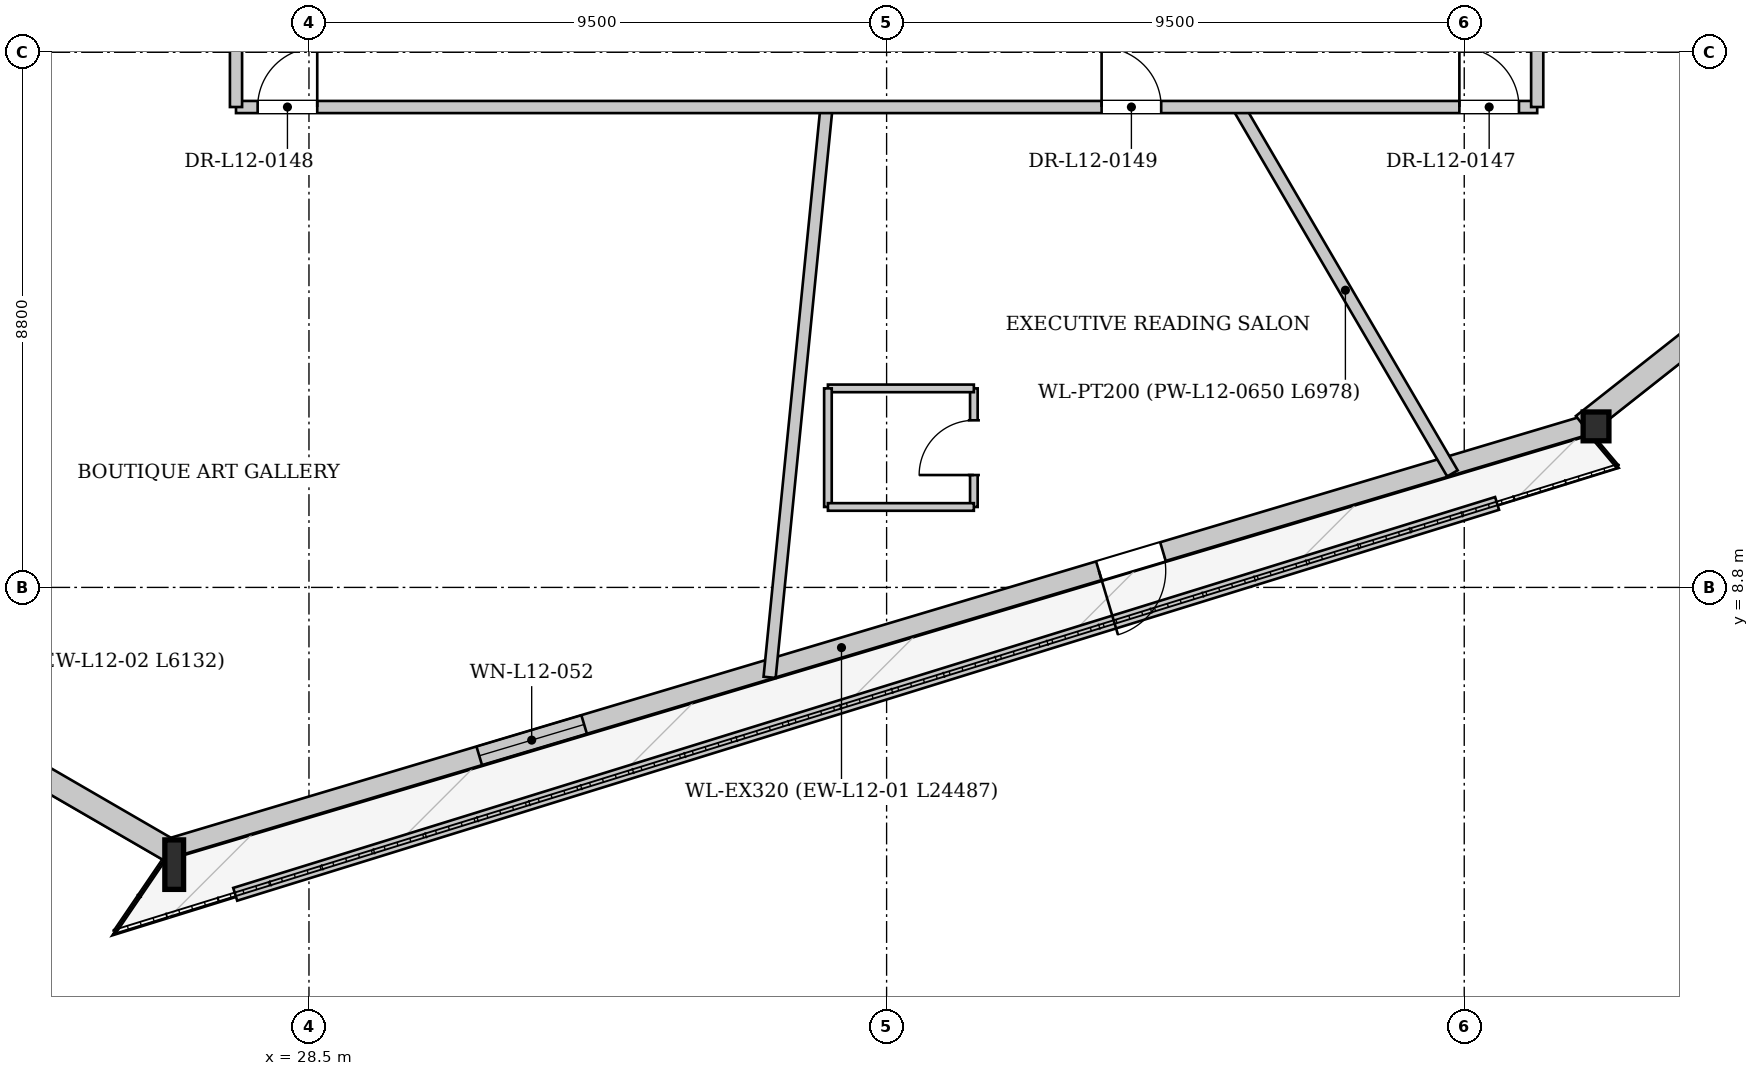
"""IFC4 building model, lengths in metres.
Left out: names, types, materials, properties, quantities, classifications, styles, units other than length and angle.
Written with IfcOpenShell. Run it as: python <this file> out.ifc"""

import sys

from ifc_helpers import new_model, si_unit, direction, frame, frame_2d, origin, origin_2d, place, context, subcontext, project, spatial, rectangle, i_section, extrude, source, transform, mapped, element, fill, save


model = new_model("IFC4")
c1 = context("Model", 3, precision=1e-05, world=origin(), true_north=direction((0.0, 1.0)))
c2 = subcontext(c1, "Body", "Model", "MODEL_VIEW")
j1 = project(units=[si_unit("LENGTHUNIT", "METRE"), si_unit("PLANEANGLEUNIT", "RADIAN")], contexts=[c1])
p1 = place(None, origin())
s1 = spatial("IfcSite", under=j1, at=p1, CompositionType="ELEMENT")
p2 = place(p1, origin())
s2 = spatial("IfcBuilding", under=s1, at=p2, CompositionType="ELEMENT")
p3 = place(p2, frame((0.0, 0.0, 50.6)))
s3 = spatial("IfcBuildingStorey", under=s2, at=p3, CompositionType="ELEMENT", Elevation=50.6)
m1 = source(origin(), c2, "Body", "SweptSolid", [
    extrude(i_section(OverallWidth=0.308, OverallDepth=0.814, WebThickness=0.021, FlangeThickness=0.04, at=origin_2d()), origin(), (0.0, 0.0, 1.0), 3.406),
])
p4 = place(p3, frame((26.109, 4.313, 0.0), z_axis=(0.102783523705, -0.042647277967, 0.993789090772), x_axis=(0.383242900224, 0.923647594826, 0.0)))
e1 = element("IfcColumn", 1, at=p4, inside=s3, PredefinedType="COLUMN", context=c2, shape_type="MappedRepresentation", body=[
    mapped(m1, transform((0.0, 0.0, 0.0), x_axis=(1.0, 0.0, 0.0), y_axis=(0.0, 1.0, 0.0), z_axis=(0.0, 0.0, 1.0), scale=1.0)),
])
m2 = source(origin(), c2, "Body", "SweptSolid", [
    extrude(i_section(OverallWidth=0.424, OverallDepth=0.474, WebThickness=0.043, FlangeThickness=0.068, at=origin_2d()), origin(), (0.0, 0.0, 1.0), 3.4),
])
p5 = place(p3, frame((49.572, 11.321, 0.0), z_axis=(0.056153057733, 0.074966486283, 0.995603766587), x_axis=(-0.800367834752, 0.599509240207, 0.0)))
e2 = element("IfcColumn", 2, at=p5, inside=s3, PredefinedType="COLUMN", context=c2, shape_type="MappedRepresentation", body=[
    mapped(m2, transform((0.0, 0.0, 0.0), x_axis=(1.0, 0.0, 0.0), y_axis=(0.0, 1.0, 0.0), z_axis=(0.0, 0.0, 1.0), scale=1.0)),
])
p6 = place(p3, frame((49.526, 11.474, 0.0), z_axis=(0.0, 0.0, 1.0), x_axis=(-0.958183644485, -0.286153985541, 0.0)))
e3 = element("IfcWall", 3, at=p6, inside=s3, PredefinedType="SOLIDWALL", context=c2, shape_type="SweptSolid", body=[
    extrude(rectangle(XDim=24.487, YDim=0.32, at=frame_2d((12.244, 0.0))), origin(), (0.0, 0.0, 1.0), 2.592),
])
p7 = place(p6, frame((7.286, 0.0, 0.0)))
e4 = element("IfcOpeningElement", 4, at=p7, cuts=e3, PredefinedType="OPENING", context=c2, shape_type="SweptSolid", body=[
    extrude(rectangle(XDim=1.1, YDim=2.3, at=frame_2d((0.55, 1.15))), frame((0.0, 0.17, 0.0), z_axis=(0.0, -1.0, 0.0), x_axis=(1.0, 0.0, 0.0)), (0.0, 0.0, 1.0), 0.34),
])
p8 = place(p6, frame((17.221, 0.0, 0.272)))
e5 = element("IfcOpeningElement", 5, at=p8, cuts=e3, PredefinedType="OPENING", context=c2, shape_type="SweptSolid", body=[
    extrude(rectangle(XDim=1.8, YDim=2.2, at=frame_2d((0.9, 1.1))), frame((0.0, 0.17, 0.0), z_axis=(0.0, -1.0, 0.0), x_axis=(1.0, 0.0, 0.0)), (0.0, 0.0, 1.0), 0.34),
])
p9 = place(p3, frame((26.204, 4.478, 0.0), z_axis=(0.0, 0.0, 1.0), x_axis=(-0.865169041167, 0.501480338803, 0.0)))
e6 = element("IfcWall", 6, at=p9, inside=s3, PredefinedType="SOLIDWALL", context=c2, shape_type="SweptSolid", body=[
    extrude(rectangle(XDim=6.132, YDim=0.38, at=frame_2d((3.066, 0.0))), origin(), (0.0, 0.0, 1.0), 2.592),
])
p10 = place(p3, frame((68.679, 26.637, 0.0), z_axis=(0.0, 0.0, 1.0), x_axis=(-0.785087909817, -0.619384350674, 0.0)))
e7 = element("IfcWall", 7, at=p10, inside=s3, PredefinedType="SOLIDWALL", context=c2, shape_type="SweptSolid", body=[
    extrude(rectangle(XDim=24.487, YDim=0.38, at=frame_2d((12.244, 0.0))), origin(), (0.0, 0.0, 1.0), 2.592),
])
p11 = place(p10, frame((6.506, 0.0, 0.222)))
e8 = element("IfcOpeningElement", 8, at=p11, cuts=e7, PredefinedType="OPENING", context=c2, shape_type="SweptSolid", body=[
    extrude(rectangle(XDim=2.2, YDim=2.25, at=frame_2d((1.1, 1.125))), frame((0.0, 0.2, 0.0), z_axis=(0.0, -1.0, 0.0), x_axis=(1.0, 0.0, 0.0)), (0.0, 0.0, 1.0), 0.4),
])
p12 = place(p10, frame((16.531, 0.0, 0.222)))
e9 = element("IfcOpeningElement", 9, at=p12, cuts=e7, PredefinedType="OPENING", context=c2, shape_type="SweptSolid", body=[
    extrude(rectangle(XDim=2.2, YDim=2.25, at=frame_2d((1.1, 1.125))), frame((0.0, 0.2, 0.0), z_axis=(0.0, -1.0, 0.0), x_axis=(1.0, 0.0, 0.0)), (0.0, 0.0, 1.0), 0.4),
])
p13 = place(p3, frame((27.287, 3.753, 0.0), z_axis=(0.0, 0.0, 1.0), x_axis=(0.95522578955, 0.295877831173, 0.0)))
e10 = element("IfcWall", 10, at=p13, inside=s3, PredefinedType="PARAPET", context=c2, shape_type="SweptSolid", body=[
    extrude(rectangle(XDim=21.726, YDim=0.22, at=frame_2d((10.863, 0.0))), origin(), (0.0, 0.0, 1.0), 0.3),
])
p14 = place(p3, frame((43.785, 16.7, 0.0), z_axis=(0.0, 0.0, 1.0), x_axis=(0.504536520789, -0.863390351573, 0.0)))
e11 = element("IfcWall", 11, at=p14, inside=s3, PredefinedType="PARTITIONING", context=c2, shape_type="SweptSolid", body=[
    extrude(rectangle(XDim=6.978, YDim=0.2, at=frame_2d((3.489, 0.0))), origin(), (0.0, 0.0, 1.0), 3.3),
])
p15 = place(p3, frame((27.3, 21.312, 0.0), z_axis=(0.0, 0.0, 1.0), x_axis=(-0.896486110775, -0.443071837502, 0.0)))
e12 = element("IfcWall", 12, at=p15, inside=s3, PredefinedType="PARTITIONING", context=c2, shape_type="SweptSolid", body=[
    extrude(rectangle(XDim=10.339, YDim=0.2, at=frame_2d((5.17, 0.0))), origin(), (0.0, 0.0, 1.0), 3.3),
])
p16 = place(p3, frame((37.012, 16.7, 0.0), z_axis=(0.0, 0.0, 1.0), x_axis=(-0.099311369571, -0.995056406378, 0.0)))
e13 = element("IfcWall", 13, at=p16, inside=s3, PredefinedType="PARTITIONING", context=c2, shape_type="SweptSolid", body=[
    extrude(rectangle(XDim=9.425, YDim=0.2, at=frame_2d((4.713, 0.0))), origin(), (0.0, 0.0, 1.0), 3.3),
])
p17 = place(p3, frame((39.435, 10.123, 0.0), z_axis=(0.0, 0.0, 1.0), x_axis=(0.0, 1.0, 0.0)))
e14 = element("IfcWall", 14, at=p17, inside=s3, PredefinedType="PARTITIONING", context=c2, shape_type="SweptSolid", body=[
    extrude(rectangle(XDim=1.95, YDim=0.125, at=frame_2d((0.975, 0.0))), origin(), (0.0, 0.0, 1.0), 3.3),
])
p18 = place(p17, frame((0.525, 0.0, 0.0)))
e15 = element("IfcOpeningElement", 15, at=p18, cuts=e14, PredefinedType="OPENING", context=c2, shape_type="SweptSolid", body=[
    extrude(rectangle(XDim=0.9, YDim=2.1, at=frame_2d((0.45, 1.05))), frame((0.0, 0.073, 0.0), z_axis=(0.0, -1.0, 0.0), x_axis=(1.0, 0.0, 0.0)), (0.0, 0.0, 1.0), 0.145),
])
p19 = place(p3, frame((39.435, 12.073, 0.0), z_axis=(0.0, 0.0, 1.0), x_axis=(-1.0, 0.0, 0.0)))
e16 = element("IfcWall", 16, at=p19, inside=s3, PredefinedType="PARTITIONING", context=c2, shape_type="SweptSolid", body=[
    extrude(rectangle(XDim=2.4, YDim=0.125, at=frame_2d((1.2, 0.0))), origin(), (0.0, 0.0, 1.0), 3.045),
])
p20 = place(p3, frame((37.035, 12.073, 0.0), z_axis=(0.0, 0.0, 1.0), x_axis=(0.0, -1.0, 0.0)))
e17 = element("IfcWall", 17, at=p20, inside=s3, PredefinedType="PARTITIONING", context=c2, shape_type="SweptSolid", body=[
    extrude(rectangle(XDim=1.95, YDim=0.125, at=frame_2d((0.975, 0.0))), origin(), (0.0, 0.0, 1.0), 3.3),
])
p21 = place(p3, frame((37.035, 10.123, 0.0), z_axis=(0.0, 0.0, 1.0), x_axis=(1.0, 0.0, 0.0)))
e18 = element("IfcWall", 18, at=p21, inside=s3, PredefinedType="PARTITIONING", context=c2, shape_type="SweptSolid", body=[
    extrude(rectangle(XDim=2.4, YDim=0.125, at=frame_2d((1.2, 0.0))), origin(), (0.0, 0.0, 1.0), 3.3),
])
p22 = place(p3, frame((27.3, 16.7, 0.0), z_axis=(0.0, 0.0, 1.0), x_axis=(1.0, 0.0, 0.0)))
e19 = element("IfcWall", 19, at=p22, inside=s3, PredefinedType="PARTITIONING", context=c2, shape_type="SweptSolid", body=[
    extrude(rectangle(XDim=21.4, YDim=0.2, at=frame_2d((10.7, 0.0))), origin(), (0.0, 0.0, 1.0), 3.3),
])
p23 = place(p22, frame((20.12, 0.0, 0.0)))
e20 = element("IfcOpeningElement", 20, at=p23, cuts=e19, PredefinedType="OPENING", context=c2, shape_type="SweptSolid", body=[
    extrude(rectangle(XDim=0.98, YDim=2.15, at=frame_2d((0.49, 1.075))), frame((0.0, 0.11, 0.0), z_axis=(0.0, -1.0, 0.0), x_axis=(1.0, 0.0, 0.0)), (0.0, 0.0, 1.0), 0.22),
])
p24 = place(p22, frame((0.356, 0.0, 0.0)))
e21 = element("IfcOpeningElement", 21, at=p24, cuts=e19, PredefinedType="OPENING", context=c2, shape_type="SweptSolid", body=[
    extrude(rectangle(XDim=0.98, YDim=2.15, at=frame_2d((0.49, 1.075))), frame((0.0, 0.11, 0.0), z_axis=(0.0, -1.0, 0.0), x_axis=(1.0, 0.0, 0.0)), (0.0, 0.0, 1.0), 0.22),
])
p25 = place(p22, frame((14.236, 0.0, 0.0)))
e22 = element("IfcOpeningElement", 22, at=p25, cuts=e19, PredefinedType="OPENING", context=c2, shape_type="SweptSolid", body=[
    extrude(rectangle(XDim=0.98, YDim=2.15, at=frame_2d((0.49, 1.075))), frame((0.0, 0.11, 0.0), z_axis=(0.0, -1.0, 0.0), x_axis=(1.0, 0.0, 0.0)), (0.0, 0.0, 1.0), 0.22),
])
p26 = place(p3, frame((27.3, 16.7, 0.0), z_axis=(0.0, 0.0, 1.0), x_axis=(0.0, 1.0, 0.0)))
e23 = element("IfcWall", 23, at=p26, inside=s3, PredefinedType="PARTITIONING", context=c2, shape_type="SweptSolid", body=[
    extrude(rectangle(XDim=19.8, YDim=0.2, at=frame_2d((9.9, 0.0))), origin(), (0.0, 0.0, 1.0), 3.3),
])
p27 = place(p26, frame((18.52, 0.0, 0.0)))
e24 = element("IfcOpeningElement", 24, at=p27, cuts=e23, PredefinedType="OPENING", context=c2, shape_type="SweptSolid", body=[
    extrude(rectangle(XDim=0.98, YDim=2.15, at=frame_2d((0.49, 1.075))), frame((0.0, 0.11, 0.0), z_axis=(0.0, -1.0, 0.0), x_axis=(1.0, 0.0, 0.0)), (0.0, 0.0, 1.0), 0.22),
])
p28 = place(p26, frame((12.028, 0.0, 0.0)))
e25 = element("IfcOpeningElement", 25, at=p28, cuts=e23, PredefinedType="OPENING", context=c2, shape_type="SweptSolid", body=[
    extrude(rectangle(XDim=0.98, YDim=2.15, at=frame_2d((0.49, 1.075))), frame((0.0, 0.11, 0.0), z_axis=(0.0, -1.0, 0.0), x_axis=(1.0, 0.0, 0.0)), (0.0, 0.0, 1.0), 0.22),
])
p29 = place(p3, frame((48.7, 16.7, 0.0), z_axis=(0.0, 0.0, 1.0), x_axis=(0.0, 1.0, 0.0)))
e26 = element("IfcWall", 26, at=p29, inside=s3, PredefinedType="PARTITIONING", context=c2, shape_type="SweptSolid", body=[
    extrude(rectangle(XDim=19.8, YDim=0.2, at=frame_2d((9.9, 0.0))), origin(), (0.0, 0.0, 1.0), 3.3),
])
p30 = place(p29, frame((16.457, 0.0, 0.0)))
e27 = element("IfcOpeningElement", 27, at=p30, cuts=e26, PredefinedType="OPENING", context=c2, shape_type="SweptSolid", body=[
    extrude(rectangle(XDim=0.98, YDim=2.15, at=frame_2d((0.49, 1.075))), frame((0.0, 0.11, 0.0), z_axis=(0.0, -1.0, 0.0), x_axis=(1.0, 0.0, 0.0)), (0.0, 0.0, 1.0), 0.22),
])
m3 = source(origin(), c2, "Body", "SweptSolid", [
    extrude(rectangle(XDim=1.1, YDim=2.3, at=frame_2d((0.55, 1.15))), frame((0.0, 0.025, 0.0), z_axis=(0.0, -1.0, 0.0), x_axis=(1.0, 0.0, 0.0)), (0.0, 0.0, 1.0), 0.05),
])
p31 = place(p7, origin())
e28 = element("IfcDoor", 28, at=p31, inside=s3, OperationType="SINGLE_SWING_RIGHT", PredefinedType="DOOR", context=c2, shape_type="MappedRepresentation", body=[
    mapped(m3, transform((0.0, 0.0, 0.0), x_axis=(1.0, 0.0, 0.0), y_axis=(0.0, 1.0, 0.0), z_axis=(0.0, 0.0, 1.0), scale=1.0)),
])
fill(e4, e28)
m4 = source(origin(), c2, "Body", "SweptSolid", [
    extrude(rectangle(XDim=1.8, YDim=2.2, at=frame_2d((0.9, 1.1))), frame((0.0, 0.03, 0.0), z_axis=(0.0, -1.0, 0.0), x_axis=(1.0, 0.0, 0.0)), (0.0, 0.0, 1.0), 0.06),
])
p32 = place(p8, origin())
e29 = element("IfcWindow", 29, at=p32, inside=s3, PartitioningType="SINGLE_PANEL", PredefinedType="WINDOW", context=c2, shape_type="MappedRepresentation", body=[
    mapped(m4, transform((0.0, 0.0, 0.0), x_axis=(1.0, 0.0, 0.0), y_axis=(0.0, 1.0, 0.0), z_axis=(0.0, 0.0, 1.0), scale=1.0)),
])
fill(e5, e29)
m5 = source(origin(), c2, "Body", "SweptSolid", [
    extrude(rectangle(XDim=0.9, YDim=2.1, at=frame_2d((0.45, 1.05))), frame((0.0, 0.025, 0.0), z_axis=(0.0, -1.0, 0.0), x_axis=(1.0, 0.0, 0.0)), (0.0, 0.0, 1.0), 0.05),
])
p33 = place(p18, origin())
e30 = element("IfcDoor", 30, at=p33, inside=s3, OperationType="SINGLE_SWING_LEFT", PredefinedType="DOOR", context=c2, shape_type="MappedRepresentation", body=[
    mapped(m5, transform((0.0, 0.0, 0.0), x_axis=(1.0, 0.0, 0.0), y_axis=(0.0, 1.0, 0.0), z_axis=(0.0, 0.0, 1.0), scale=1.0)),
])
fill(e15, e30)
m6 = source(origin(), c2, "Body", "SweptSolid", [
    extrude(rectangle(XDim=0.98, YDim=2.15, at=frame_2d((0.49, 1.075))), frame((0.0, 0.025, 0.0), z_axis=(0.0, -1.0, 0.0), x_axis=(1.0, 0.0, 0.0)), (0.0, 0.0, 1.0), 0.05),
])
p34 = place(p23, origin())
e31 = element("IfcDoor", 31, at=p34, inside=s3, OperationType="SINGLE_SWING_LEFT", PredefinedType="DOOR", context=c2, shape_type="MappedRepresentation", body=[
    mapped(m6, transform((0.0, 0.0, 0.0), x_axis=(1.0, 0.0, 0.0), y_axis=(0.0, 1.0, 0.0), z_axis=(0.0, 0.0, 1.0), scale=1.0)),
])
fill(e20, e31)
p35 = place(p24, origin())
e32 = element("IfcDoor", 32, at=p35, inside=s3, OperationType="SINGLE_SWING_RIGHT", PredefinedType="DOOR", context=c2, shape_type="MappedRepresentation", body=[
    mapped(m6, transform((0.0, 0.0, 0.0), x_axis=(1.0, 0.0, 0.0), y_axis=(0.0, 1.0, 0.0), z_axis=(0.0, 0.0, 1.0), scale=1.0)),
])
fill(e21, e32)
p36 = place(p25, origin())
e33 = element("IfcDoor", 33, at=p36, inside=s3, OperationType="SINGLE_SWING_LEFT", PredefinedType="DOOR", context=c2, shape_type="MappedRepresentation", body=[
    mapped(m6, transform((0.0, 0.0, 0.0), x_axis=(1.0, 0.0, 0.0), y_axis=(0.0, 1.0, 0.0), z_axis=(0.0, 0.0, 1.0), scale=1.0)),
])
fill(e22, e33)
save(model, sys.argv[1])
